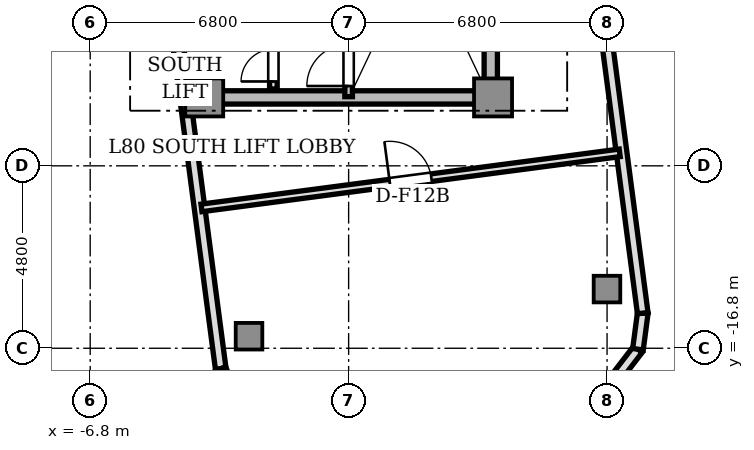
"""IFC4 building model, lengths in metres.
Left out: names, types, materials, properties, quantities, classifications, styles, units other than length and angle.
Written with IfcOpenShell. Run it as: python <this file> out.ifc"""

import sys

from ifc_helpers import new_model, si_unit, direction, frame, frame_2d, origin, origin_2d, place, context, subcontext, project, spatial, rectangle, extrude, source, transform, mapped, element, fill, save


model = new_model("IFC4")
c1 = context("Model", 3, precision=1e-05, world=origin(), true_north=direction((0.0, 1.0)))
c2 = subcontext(c1, "Body", "Model", "MODEL_VIEW")
j1 = project(units=[si_unit("LENGTHUNIT", "METRE"), si_unit("PLANEANGLEUNIT", "RADIAN")], contexts=[c1])
p1 = place(None, origin())
s1 = spatial("IfcSite", under=j1, at=p1, CompositionType="ELEMENT")
p2 = place(p1, origin())
s2 = spatial("IfcBuilding", under=s1, at=p2, CompositionType="ELEMENT")
p3 = place(p2, frame((0.0, 0.0, 288.9)))
s3 = spatial("IfcBuildingStorey", under=s2, at=p3, CompositionType="ELEMENT", Elevation=288.9)
p4 = place(p3, frame((-3.55, -10.2, 0.0), z_axis=(0.0, 0.0, 1.0), x_axis=(1.0, 0.0, 0.0)))
e1 = element("IfcWall", 1, at=p4, inside=s3, PredefinedType="SHEAR", context=c2, shape_type="SweptSolid", body=[
    extrude(rectangle(XDim=7.1, YDim=0.35, at=frame_2d((3.55, 0.0))), origin(), (0.0, 0.0, 1.0), 3.5),
])
p5 = place(p3, frame((3.74, -9.75, 0.0), z_axis=(0.0, 0.0, 1.0), x_axis=(0.0, 1.0, 0.0)))
e2 = element("IfcWall", 2, at=p5, inside=s3, PredefinedType="SHEAR", context=c2, shape_type="SweptSolid", body=[
    extrude(rectangle(XDim=6.9, YDim=0.35, at=frame_2d((3.45, 0.0))), origin(), (0.0, 0.0, 1.0), 3.5),
])
m1 = source(origin(), c2, "Body", "SweptSolid", [
    extrude(rectangle(XDim=1.0, YDim=1.0, at=origin_2d()), origin(), (0.0, 0.0, 1.0), 3.5),
])
for number, where, z_axis, x_axis in (
    (3, (-3.8, -10.2, 0.0), (0.0, 0.0, 1.0), (1.0, 0.0, 0.0)),
    (4, (3.8, -10.2, 0.0), (0.0, 0.0, 1.0), (1.0, 0.0, 0.0)),
):
    element("IfcColumn", number, at=place(p3, frame(where, z_axis=z_axis, x_axis=x_axis)), inside=s3, PredefinedType="COLUMN", context=c2, shape_type="MappedRepresentation", body=[
        mapped(m1, transform((0.0, 0.0, 0.0), scale=1.0)),
    ])
m2 = source(origin(), c2, "Body", "SweptSolid", [
    extrude(rectangle(XDim=0.7, YDim=0.7, at=origin_2d()), origin(), (0.0, 0.0, 1.0), 3.5),
])
for number, where, z_axis, x_axis in (
    (5, (-2.621, -16.483, 0.0), (0.0, 0.0, 1.0), (1.0, 0.0, 0.0)),
    (6, (6.798, -15.243, 0.0), (0.0, 0.0, 1.0), (1.0, 0.0, 0.0)),
):
    element("IfcColumn", number, at=place(p3, frame(where, z_axis=z_axis, x_axis=x_axis)), inside=s3, PredefinedType="COLUMN", context=c2, shape_type="MappedRepresentation", body=[
        mapped(m2, transform((0.0, 0.0, 0.0), scale=1.0)),
    ])
p6 = place(p3, frame((-4.821, -6.283, 0.0), z_axis=(0.0, 0.0, 1.0), x_axis=(0.130521347626, -0.991445499165, 0.0)))
e7 = element("IfcWall", 7, at=p6, inside=s3, PredefinedType="SOLIDWALL", context=c2, shape_type="SweptSolid", body=[
    extrude(rectangle(XDim=11.15, YDim=0.28, at=frame_2d((5.575, 0.0))), origin(), (0.0, 0.0, 1.0), 3.5),
])
p7 = place(p3, frame((-3.366, -17.338, 0.0), z_axis=(0.0, 0.0, 1.0), x_axis=(0.382659506909, -0.923889442397, 0.0)))
e8 = element("IfcWall", 8, at=p7, inside=s3, PredefinedType="SOLIDWALL", context=c2, shape_type="SweptSolid", body=[
    extrude(rectangle(XDim=0.958, YDim=0.28, at=frame_2d((0.479, 0.0))), origin(), (0.0, 0.0, 1.0), 3.5),
])
p8 = place(p3, frame((7.031, -17.585, 0.0), z_axis=(0.0, 0.0, 1.0), x_axis=(0.60861352168, 0.793466811674, 0.0)))
e9 = element("IfcWall", 9, at=p8, inside=s3, PredefinedType="SOLIDWALL", context=c2, shape_type="SweptSolid", body=[
    extrude(rectangle(XDim=0.958, YDim=0.28, at=frame_2d((0.479, 0.0))), origin(), (0.0, 0.0, 1.0), 3.5),
])
p9 = place(p3, frame((7.613, -16.825, 0.0), z_axis=(0.0, 0.0, 1.0), x_axis=(0.130527053476, 0.991444747987, 0.0)))
e10 = element("IfcWall", 10, at=p9, inside=s3, PredefinedType="SOLIDWALL", context=c2, shape_type="SweptSolid", body=[
    extrude(rectangle(XDim=0.958, YDim=0.28, at=frame_2d((0.479, 0.0))), origin(), (0.0, 0.0, 1.0), 3.5),
])
p10 = place(p3, frame((7.738, -15.876, 0.0), z_axis=(0.0, 0.0, 1.0), x_axis=(-0.130521347626, 0.991445499165, 0.0)))
e11 = element("IfcWall", 11, at=p10, inside=s3, PredefinedType="SOLIDWALL", context=c2, shape_type="SweptSolid", body=[
    extrude(rectangle(XDim=11.15, YDim=0.28, at=frame_2d((5.575, 0.0))), origin(), (0.0, 0.0, 1.0), 3.5),
])
p11 = place(p3, frame((0.0, -10.18, 0.0), z_axis=(0.0, 0.0, 1.0), x_axis=(0.0, 1.0, 0.0)))
e12 = element("IfcWall", 12, at=p11, inside=s3, PredefinedType="SOLIDWALL", context=c2, shape_type="SweptSolid", body=[
    extrude(rectangle(XDim=7.68, YDim=0.2, at=frame_2d((3.84, 0.0))), origin(), (0.0, 0.0, 1.0), 3.5),
])
p12 = place(p11, frame((0.28, 0.0, 0.0)))
e13 = element("IfcOpeningElement", 13, at=p12, cuts=e12, PredefinedType="OPENING", context=c2, shape_type="SweptSolid", body=[
    extrude(rectangle(XDim=1.1, YDim=2.15, at=frame_2d((0.55, 1.075))), frame((0.0, 0.11, 0.0), z_axis=(0.0, -1.0, 0.0), x_axis=(1.0, 0.0, 0.0)), (0.0, 0.0, 1.0), 0.22),
])
p13 = place(p3, frame((-1.98, -9.98, 0.0), z_axis=(0.0, 0.0, 1.0), x_axis=(0.0, 1.0, 0.0)))
e14 = element("IfcWall", 14, at=p13, inside=s3, PredefinedType="SOLIDWALL", context=c2, shape_type="SweptSolid", body=[
    extrude(rectangle(XDim=4.66, YDim=0.2, at=frame_2d((2.33, 0.0))), origin(), (0.0, 0.0, 1.0), 3.05),
])
p14 = place(p13, frame((0.2, 0.0, 0.0)))
e15 = element("IfcOpeningElement", 15, at=p14, cuts=e14, PredefinedType="OPENING", context=c2, shape_type="SweptSolid", body=[
    extrude(rectangle(XDim=0.85, YDim=2.1, at=frame_2d((0.425, 1.05))), frame((0.0, 0.11, 0.0), z_axis=(0.0, -1.0, 0.0), x_axis=(1.0, 0.0, 0.0)), (0.0, 0.0, 1.0), 0.22),
])
p15 = place(p3, frame((-3.872, -13.108, 0.0), z_axis=(0.0, 0.0, 1.0), x_axis=(0.991443437127, 0.130537009991, 0.0)))
e16 = element("IfcWall", 16, at=p15, inside=s3, PredefinedType="SOLIDWALL", context=c2, shape_type="SweptSolid", body=[
    extrude(rectangle(XDim=11.1, YDim=0.2, at=frame_2d((5.55, 0.0))), origin(), (0.0, 0.0, 1.0), 3.05),
])
p16 = place(p15, frame((5.0, 0.0, 0.0)))
e17 = element("IfcOpeningElement", 17, at=p16, cuts=e16, PredefinedType="OPENING", context=c2, shape_type="SweptSolid", body=[
    extrude(rectangle(XDim=1.1, YDim=2.15, at=frame_2d((0.55, 1.075))), frame((0.0, 0.11, 0.0), z_axis=(0.0, -1.0, 0.0), x_axis=(1.0, 0.0, 0.0)), (0.0, 0.0, 1.0), 0.22),
])
m3 = source(origin(), c2, "Body", "SweptSolid", [
    extrude(rectangle(XDim=1.1, YDim=0.05, at=origin_2d()), origin(), (0.0, 0.0, 1.0), 2.15),
])
p17 = place(p12, frame((0.55, 0.0, 0.0)))
e18 = element("IfcDoor", 18, at=p17, inside=s3, OperationType="SINGLE_SWING_LEFT", PredefinedType="DOOR", context=c2, shape_type="MappedRepresentation", body=[
    mapped(m3, transform((0.0, 0.0, 0.0), scale=1.0)),
])
fill(e13, e18)
m4 = source(origin(), c2, "Body", "SweptSolid", [
    extrude(rectangle(XDim=0.85, YDim=0.05, at=origin_2d()), origin(), (0.0, 0.0, 1.0), 2.1),
])
p18 = place(p14, frame((0.425, 0.0, 0.0)))
e19 = element("IfcDoor", 19, at=p18, inside=s3, OperationType="SINGLE_SWING_LEFT", PredefinedType="DOOR", context=c2, shape_type="MappedRepresentation", body=[
    mapped(m4, transform((0.0, 0.0, 0.0), scale=1.0)),
])
fill(e15, e19)
p19 = place(p16, frame((0.55, 0.0, 0.0)))
e20 = element("IfcDoor", 20, at=p19, inside=s3, OperationType="SINGLE_SWING_LEFT", PredefinedType="DOOR", context=c2, shape_type="MappedRepresentation", body=[
    mapped(m3, transform((0.0, 0.0, 0.0), scale=1.0)),
])
fill(e17, e20)
save(model, sys.argv[1])
